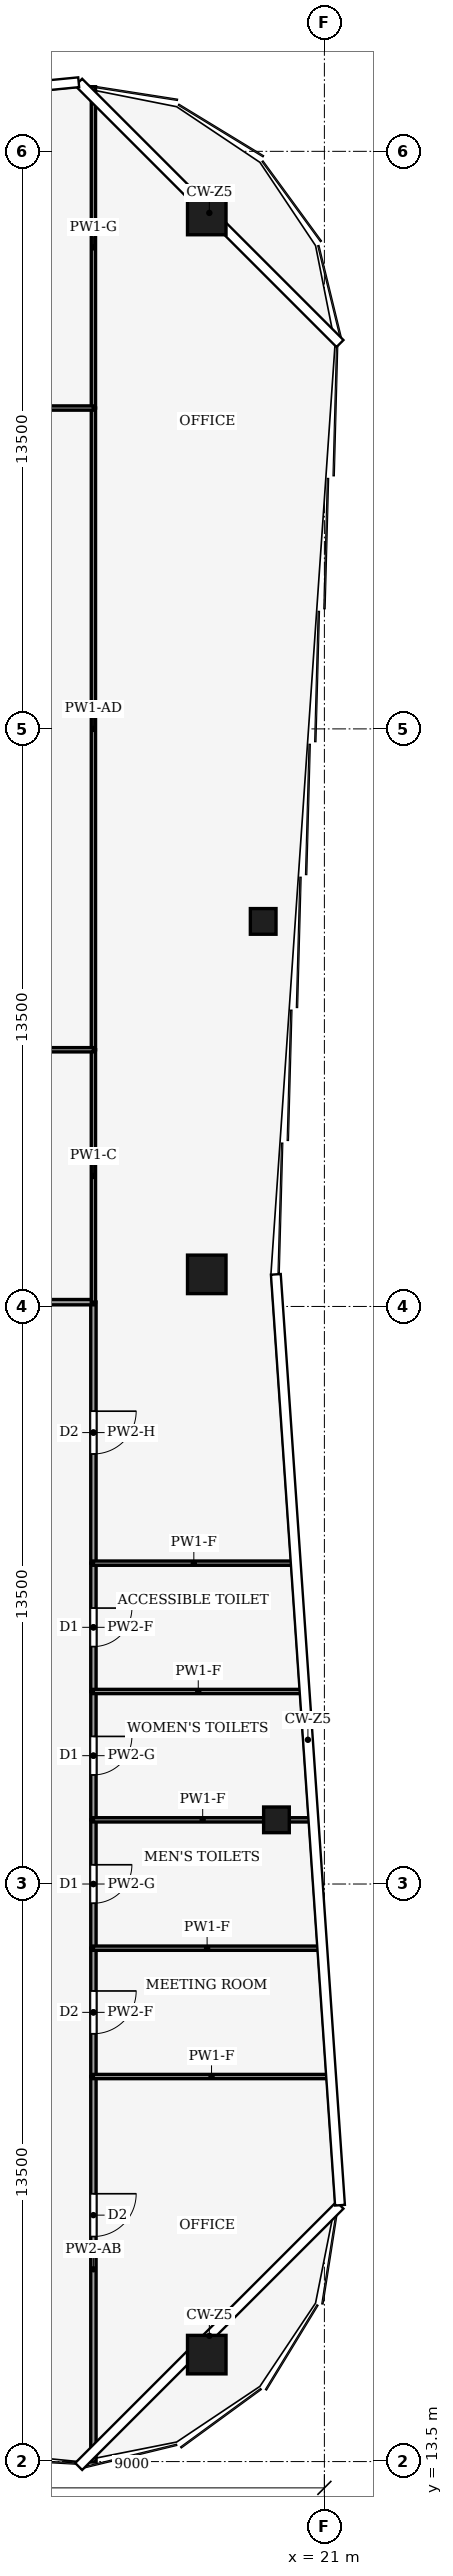
"""IFC4 building model, lengths in metres.
Left out: names, types, materials, properties, quantities, classifications, styles, units other than length and angle.
Written with IfcOpenShell. Run it as: python <this file> out.ifc"""

import sys

from ifc_helpers import new_model, si_unit, direction, frame, frame_2d, origin, origin_2d, place, context, subcontext, project, spatial, rectangle, hollow_rectangle, extrude, element, fill, save


model = new_model("IFC4")
c1 = context("Model", 3, precision=1e-05, world=origin(), true_north=direction((0.0, 1.0)))
c2 = subcontext(c1, "Body", "Model", "MODEL_VIEW")
j1 = project(units=[si_unit("LENGTHUNIT", "METRE"), si_unit("PLANEANGLEUNIT", "RADIAN")], contexts=[c1])
p1 = place(None, origin())
s1 = spatial("IfcSite", under=j1, at=p1, CompositionType="ELEMENT")
p2 = place(p1, origin())
s2 = spatial("IfcBuilding", under=s1, at=p2, CompositionType="ELEMENT")
p3 = place(p2, frame((0.0, 0.0, 314.0)))
s3 = spatial("IfcBuildingStorey", under=s2, at=p3, CompositionType="ELEMENT", Elevation=314.0)
for number, where, z_axis, x_axis in (
    (1, (18.25, 66.0, 0.0), (0.0, 0.0, 1.0), (1.0, 0.0, 0.0)),
    (2, (18.25, 41.25, 0.0), (0.0, 0.0, 1.0), (1.0, 0.0, 0.0)),
    (3, (18.25, 16.0, 0.0), (0.0, 0.0, 1.0), (1.0, 0.0, 0.0)),
):
    element("IfcColumn", number, at=place(p3, frame(where, z_axis=z_axis, x_axis=x_axis)), inside=s3, PredefinedType="COLUMN", context=c2, shape_type="SweptSolid", body=[
        extrude(hollow_rectangle(XDim=0.9, YDim=0.9, WallThickness=0.04, at=origin_2d()), origin(), (0.0, 0.0, 1.0), 4.0),
    ])
for number, where, z_axis, x_axis in (
    (4, (19.879, 28.5, 0.0), (0.0, 0.0, 1.0), (1.0, 0.0, 0.0)),
    (5, (19.569, 49.5, 0.0), (0.0, 0.0, 1.0), (1.0, 0.0, 0.0)),
):
    element("IfcColumn", number, at=place(p3, frame(where, z_axis=z_axis, x_axis=x_axis)), inside=s3, PredefinedType="COLUMN", context=c2, shape_type="SweptSolid", body=[
        extrude(hollow_rectangle(XDim=0.6, YDim=0.6, WallThickness=0.025, at=origin_2d()), origin(), (0.0, 0.0, 1.0), 4.0),
    ])
p4 = place(p3, frame((15.6, 22.5, 0.0), z_axis=(0.0, 0.0, 1.0), x_axis=(0.0, -1.0, 0.0)))
e6 = element("IfcWall", 6, at=p4, inside=s3, PredefinedType="PARTITIONING", context=c2, shape_type="SweptSolid", body=[
    extrude(rectangle(XDim=9.01, YDim=0.125, at=frame_2d((4.505, 0.0))), origin(), (0.0, 0.0, 1.0), 2.93),
])
p5 = place(p4, frame((2.74, 0.0, 0.0)))
e7 = element("IfcOpeningElement", 7, at=p5, cuts=e6, PredefinedType="OPENING", context=c2, shape_type="SweptSolid", body=[
    extrude(rectangle(XDim=1.0, YDim=2.1, at=frame_2d((0.5, 1.05))), frame((0.0, 0.073, 0.0), z_axis=(0.0, -1.0, 0.0), x_axis=(1.0, 0.0, 0.0)), (0.0, 0.0, 1.0), 0.145),
])
p6 = place(p3, frame((15.6, 25.5, 0.0), z_axis=(0.0, 0.0, 1.0), x_axis=(0.0, -1.0, 0.0)))
e8 = element("IfcWall", 8, at=p6, inside=s3, PredefinedType="PARTITIONING", context=c2, shape_type="SweptSolid", body=[
    extrude(rectangle(XDim=3.0, YDim=0.125, at=frame_2d((1.5, 0.0))), origin(), (0.0, 0.0, 1.0), 3.54),
])
p7 = place(p6, frame((1.0, 0.0, 0.0)))
e9 = element("IfcOpeningElement", 9, at=p7, cuts=e8, PredefinedType="OPENING", context=c2, shape_type="SweptSolid", body=[
    extrude(rectangle(XDim=1.0, YDim=2.1, at=frame_2d((0.5, 1.05))), frame((0.0, 0.073, 0.0), z_axis=(0.0, -1.0, 0.0), x_axis=(1.0, 0.0, 0.0)), (0.0, 0.0, 1.0), 0.145),
])
p8 = place(p3, frame((15.6, 28.5, 0.0), z_axis=(0.0, 0.0, 1.0), x_axis=(0.0, -1.0, 0.0)))
e10 = element("IfcWall", 10, at=p8, inside=s3, PredefinedType="PARTITIONING", context=c2, shape_type="SweptSolid", body=[
    extrude(rectangle(XDim=3.0, YDim=0.125, at=frame_2d((1.5, 0.0))), origin(), (0.0, 0.0, 1.0), 3.87),
])
p9 = place(p8, frame((1.05, 0.0, 0.0)))
e11 = element("IfcOpeningElement", 11, at=p9, cuts=e10, PredefinedType="OPENING", context=c2, shape_type="SweptSolid", body=[
    extrude(rectangle(XDim=0.9, YDim=2.1, at=frame_2d((0.45, 1.05))), frame((0.0, 0.073, 0.0), z_axis=(0.0, -1.0, 0.0), x_axis=(1.0, 0.0, 0.0)), (0.0, 0.0, 1.0), 0.145),
])
p10 = place(p3, frame((15.6, 31.5, 0.0), z_axis=(0.0, 0.0, 1.0), x_axis=(0.0, -1.0, 0.0)))
e12 = element("IfcWall", 12, at=p10, inside=s3, PredefinedType="PARTITIONING", context=c2, shape_type="SweptSolid", body=[
    extrude(rectangle(XDim=3.0, YDim=0.125, at=frame_2d((1.5, 0.0))), origin(), (0.0, 0.0, 1.0), 3.87),
])
p11 = place(p10, frame((1.05, 0.0, 0.0)))
e13 = element("IfcOpeningElement", 13, at=p11, cuts=e12, PredefinedType="OPENING", context=c2, shape_type="SweptSolid", body=[
    extrude(rectangle(XDim=0.9, YDim=2.1, at=frame_2d((0.45, 1.05))), frame((0.0, 0.073, 0.0), z_axis=(0.0, -1.0, 0.0), x_axis=(1.0, 0.0, 0.0)), (0.0, 0.0, 1.0), 0.145),
])
p12 = place(p3, frame((15.6, 34.5, 0.0), z_axis=(0.0, 0.0, 1.0), x_axis=(0.0, -1.0, 0.0)))
e14 = element("IfcWall", 14, at=p12, inside=s3, PredefinedType="PARTITIONING", context=c2, shape_type="SweptSolid", body=[
    extrude(rectangle(XDim=3.0, YDim=0.125, at=frame_2d((1.5, 0.0))), origin(), (0.0, 0.0, 1.0), 3.54),
])
p13 = place(p12, frame((1.05, 0.0, 0.0)))
e15 = element("IfcOpeningElement", 15, at=p13, cuts=e14, PredefinedType="OPENING", context=c2, shape_type="SweptSolid", body=[
    extrude(rectangle(XDim=0.9, YDim=2.1, at=frame_2d((0.45, 1.05))), frame((0.0, 0.073, 0.0), z_axis=(0.0, -1.0, 0.0), x_axis=(1.0, 0.0, 0.0)), (0.0, 0.0, 1.0), 0.145),
])
p14 = place(p3, frame((15.6, 40.604, 0.0), z_axis=(0.0, 0.0, 1.0), x_axis=(0.0, -1.0, 0.0)))
e16 = element("IfcWall", 16, at=p14, inside=s3, PredefinedType="PARTITIONING", context=c2, shape_type="SweptSolid", body=[
    extrude(rectangle(XDim=6.104, YDim=0.125, at=frame_2d((3.052, 0.0))), origin(), (0.0, 0.0, 1.0), 3.14),
])
p15 = place(p14, frame((2.552, 0.0, 0.0)))
e17 = element("IfcOpeningElement", 17, at=p15, cuts=e16, PredefinedType="OPENING", context=c2, shape_type="SweptSolid", body=[
    extrude(rectangle(XDim=1.0, YDim=2.1, at=frame_2d((0.5, 1.05))), frame((0.0, 0.073, 0.0), z_axis=(0.0, -1.0, 0.0), x_axis=(1.0, 0.0, 0.0)), (0.0, 0.0, 1.0), 0.145),
])
p16 = place(p3, frame((15.6, 40.6, 0.0), z_axis=(0.0, 0.0, 1.0), x_axis=(-1.0, 0.0, 0.0)))
e18 = element("IfcWall", 18, at=p16, inside=s3, PredefinedType="PARTITIONING", context=c2, shape_type="SweptSolid", body=[
    extrude(rectangle(XDim=3.6, YDim=0.125, at=frame_2d((1.8, 0.0))), origin(), (0.0, 0.0, 1.0), 3.39),
])
p17 = place(p3, frame((21.123, 22.5, 0.0), z_axis=(0.0, 0.0, 1.0), x_axis=(-1.0, 0.0, 0.0)))
e19 = element("IfcWall", 19, at=p17, inside=s3, PredefinedType="PARTITIONING", context=c2, shape_type="SweptSolid", body=[
    extrude(rectangle(XDim=5.523, YDim=0.1, at=frame_2d((2.761, 0.0))), origin(), (0.0, 0.0, 1.0), 3.04),
])
p18 = place(p3, frame((20.916, 25.5, 0.0), z_axis=(0.0, 0.0, 1.0), x_axis=(-1.0, 0.0, 0.0)))
e20 = element("IfcWall", 20, at=p18, inside=s3, PredefinedType="PARTITIONING", context=c2, shape_type="SweptSolid", body=[
    extrude(rectangle(XDim=5.316, YDim=0.1, at=frame_2d((2.658, 0.0))), origin(), (0.0, 0.0, 1.0), 3.04),
])
p19 = place(p3, frame((20.709, 28.5, 0.0), z_axis=(0.0, 0.0, 1.0), x_axis=(-1.0, 0.0, 0.0)))
e21 = element("IfcWall", 21, at=p19, inside=s3, PredefinedType="PARTITIONING", context=c2, shape_type="SweptSolid", body=[
    extrude(rectangle(XDim=5.109, YDim=0.1, at=frame_2d((2.555, 0.0))), origin(), (0.0, 0.0, 1.0), 3.04),
])
p20 = place(p3, frame((20.502, 31.5, 0.0), z_axis=(0.0, 0.0, 1.0), x_axis=(-1.0, 0.0, 0.0)))
e22 = element("IfcWall", 22, at=p20, inside=s3, PredefinedType="PARTITIONING", context=c2, shape_type="SweptSolid", body=[
    extrude(rectangle(XDim=4.902, YDim=0.1, at=frame_2d((2.451, 0.0))), origin(), (0.0, 0.0, 1.0), 3.04),
])
p21 = place(p3, frame((20.295, 34.5, 0.0), z_axis=(0.0, 0.0, 1.0), x_axis=(-1.0, 0.0, 0.0)))
e23 = element("IfcWall", 23, at=p21, inside=s3, PredefinedType="PARTITIONING", context=c2, shape_type="SweptSolid", body=[
    extrude(rectangle(XDim=4.695, YDim=0.1, at=frame_2d((2.348, 0.0))), origin(), (0.0, 0.0, 1.0), 3.04),
])
p22 = place(p3, frame((15.6, 46.5, 0.0), z_axis=(0.0, 0.0, 1.0), x_axis=(0.0, -1.0, 0.0)))
e24 = element("IfcWall", 24, at=p22, inside=s3, PredefinedType="PARTITIONING", context=c2, shape_type="SweptSolid", body=[
    extrude(rectangle(XDim=5.9, YDim=0.1, at=frame_2d((2.95, 0.0))), origin(), (0.0, 0.0, 1.0), 3.87),
])
p23 = place(p3, frame((15.6, 61.5, 0.0), z_axis=(0.0, 0.0, 1.0), x_axis=(0.0, -1.0, 0.0)))
e25 = element("IfcWall", 25, at=p23, inside=s3, PredefinedType="PARTITIONING", context=c2, shape_type="SweptSolid", body=[
    extrude(rectangle(XDim=15.0, YDim=0.1, at=frame_2d((7.5, 0.0))), origin(), (0.0, 0.0, 1.0), 3.35),
])
p24 = place(p3, frame((15.6, 69.01, 0.0), z_axis=(0.0, 0.0, 1.0), x_axis=(0.0, -1.0, 0.0)))
e26 = element("IfcWall", 26, at=p24, inside=s3, PredefinedType="PARTITIONING", context=c2, shape_type="SweptSolid", body=[
    extrude(rectangle(XDim=7.51, YDim=0.1, at=frame_2d((3.755, 0.0))), origin(), (0.0, 0.0, 1.0), 2.93),
])
p25 = place(p3, frame((15.6, 46.5, 0.0), z_axis=(0.0, 0.0, 1.0), x_axis=(-1.0, 0.0, 0.0)))
e27 = element("IfcWall", 27, at=p25, inside=s3, PredefinedType="PARTITIONING", context=c2, shape_type="SweptSolid", body=[
    extrude(rectangle(XDim=3.604, YDim=0.1, at=frame_2d((1.802, 0.0))), origin(), (0.0, 0.0, 1.0), 3.87),
])
p26 = place(p3, frame((6.0, 61.5, 0.0), z_axis=(0.0, 0.0, 1.0), x_axis=(1.0, 0.0, 0.0)))
e28 = element("IfcWall", 28, at=p26, inside=s3, PredefinedType="PARTITIONING", context=c2, shape_type="SweptSolid", body=[
    extrude(rectangle(XDim=9.6, YDim=0.1, at=frame_2d((4.8, 0.0))), origin(), (0.0, 0.0, 1.0), 3.24),
])
p27 = place(p26, frame((4.3, 0.0, 0.0)))
e29 = element("IfcOpeningElement", 29, at=p27, cuts=e28, PredefinedType="OPENING", context=c2, shape_type="SweptSolid", body=[
    extrude(rectangle(XDim=1.0, YDim=2.1, at=frame_2d((0.5, 1.05))), frame((0.0, 0.06, 0.0), z_axis=(0.0, -1.0, 0.0), x_axis=(1.0, 0.0, 0.0)), (0.0, 0.0, 1.0), 0.12),
])
p28 = place(p5, origin())
e30 = element("IfcDoor", 30, at=p28, inside=s3, OperationType="SINGLE_SWING_LEFT", PredefinedType="DOOR", context=c2, shape_type="SweptSolid", body=[
    extrude(rectangle(XDim=1.0, YDim=2.1, at=frame_2d((0.5, 1.05))), frame((0.0, 0.025, 0.0), z_axis=(0.0, -1.0, 0.0), x_axis=(1.0, 0.0, 0.0)), (0.0, 0.0, 1.0), 0.05),
])
fill(e7, e30)
p29 = place(p7, origin())
e31 = element("IfcDoor", 31, at=p29, inside=s3, OperationType="SINGLE_SWING_LEFT", PredefinedType="DOOR", context=c2, shape_type="SweptSolid", body=[
    extrude(rectangle(XDim=1.0, YDim=2.1, at=frame_2d((0.5, 1.05))), frame((0.0, 0.025, 0.0), z_axis=(0.0, -1.0, 0.0), x_axis=(1.0, 0.0, 0.0)), (0.0, 0.0, 1.0), 0.05),
])
fill(e9, e31)
p30 = place(p9, origin())
e32 = element("IfcDoor", 32, at=p30, inside=s3, OperationType="SINGLE_SWING_RIGHT", PredefinedType="DOOR", context=c2, shape_type="SweptSolid", body=[
    extrude(rectangle(XDim=0.9, YDim=2.1, at=frame_2d((0.45, 1.05))), frame((0.0, 0.025, 0.0), z_axis=(0.0, -1.0, 0.0), x_axis=(1.0, 0.0, 0.0)), (0.0, 0.0, 1.0), 0.05),
])
fill(e11, e32)
p31 = place(p11, origin())
e33 = element("IfcDoor", 33, at=p31, inside=s3, OperationType="SINGLE_SWING_LEFT", PredefinedType="DOOR", context=c2, shape_type="SweptSolid", body=[
    extrude(rectangle(XDim=0.9, YDim=2.1, at=frame_2d((0.45, 1.05))), frame((0.0, 0.025, 0.0), z_axis=(0.0, -1.0, 0.0), x_axis=(1.0, 0.0, 0.0)), (0.0, 0.0, 1.0), 0.05),
])
fill(e13, e33)
p32 = place(p13, origin())
e34 = element("IfcDoor", 34, at=p32, inside=s3, OperationType="SINGLE_SWING_RIGHT", PredefinedType="DOOR", context=c2, shape_type="SweptSolid", body=[
    extrude(rectangle(XDim=0.9, YDim=2.1, at=frame_2d((0.45, 1.05))), frame((0.0, 0.025, 0.0), z_axis=(0.0, -1.0, 0.0), x_axis=(1.0, 0.0, 0.0)), (0.0, 0.0, 1.0), 0.05),
])
fill(e15, e34)
p33 = place(p15, origin())
e35 = element("IfcDoor", 35, at=p33, inside=s3, OperationType="SINGLE_SWING_LEFT", PredefinedType="DOOR", context=c2, shape_type="SweptSolid", body=[
    extrude(rectangle(XDim=1.0, YDim=2.1, at=frame_2d((0.5, 1.05))), frame((0.0, 0.025, 0.0), z_axis=(0.0, -1.0, 0.0), x_axis=(1.0, 0.0, 0.0)), (0.0, 0.0, 1.0), 0.05),
])
fill(e17, e35)
save(model, sys.argv[1])
